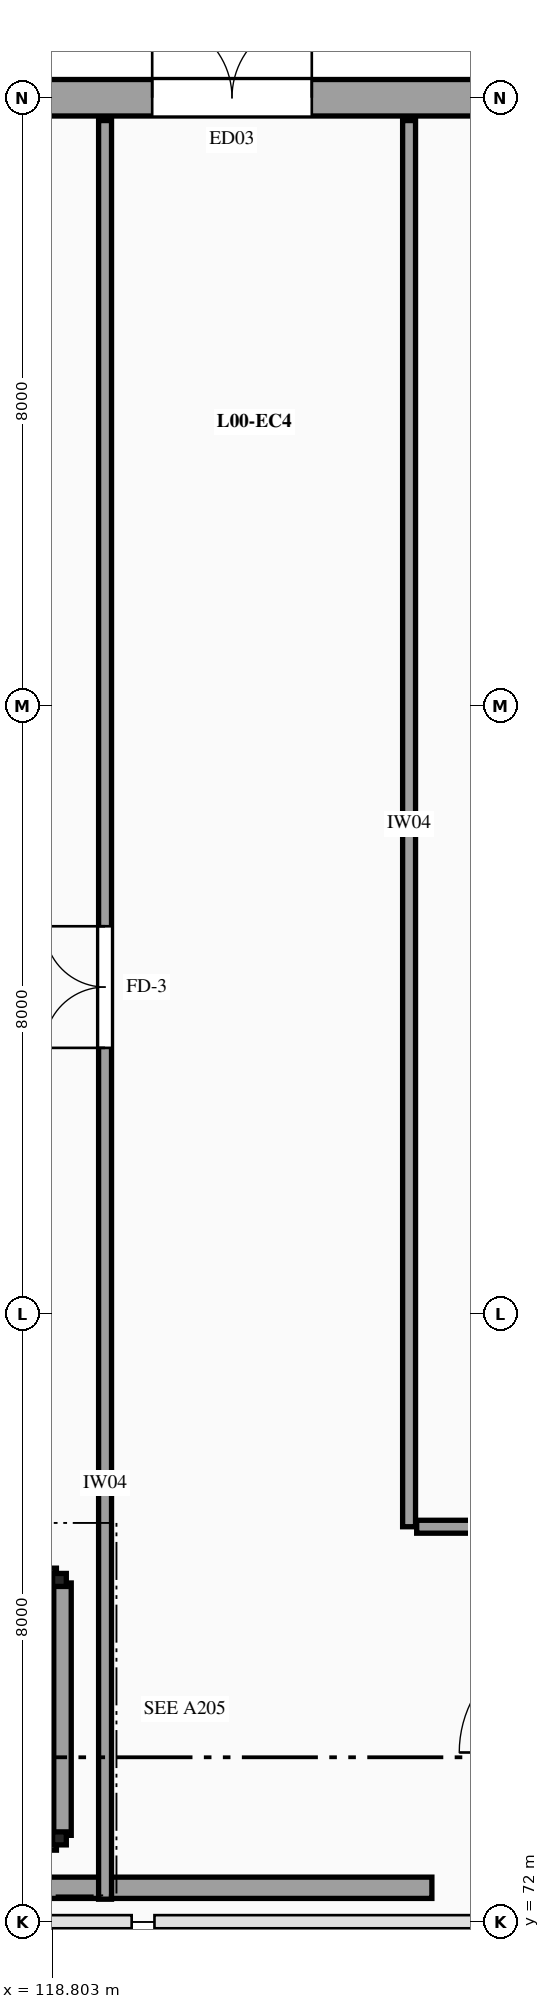
"""IFC4 building model, lengths in metres.
Left out: names, types, materials, properties, quantities, classifications, styles, units other than length and angle.
Written with IfcOpenShell. Run it as: python <this file> out.ifc"""

import sys

from ifc_helpers import new_model, si_unit, direction, frame, frame_2d, origin, origin_2d, place, context, subcontext, project, spatial, rectangle, i_section, extrude, element, fill, save


model = new_model("IFC4")
c1 = context("Model", 3, precision=1e-05, world=origin(), true_north=direction((0.0, 1.0)))
c2 = subcontext(c1, "Body", "Model", "MODEL_VIEW")
j1 = project(units=[si_unit("LENGTHUNIT", "METRE"), si_unit("PLANEANGLEUNIT", "RADIAN")], contexts=[c1])
p1 = place(None, origin())
s1 = spatial("IfcSite", under=j1, at=p1, CompositionType="ELEMENT")
p2 = place(p1, origin())
s2 = spatial("IfcBuilding", under=s1, at=p2, CompositionType="ELEMENT")
p3 = place(p2, origin())
s3 = spatial("IfcBuildingStorey", under=s2, at=p3, CompositionType="ELEMENT", Elevation=0.0)
for number, where, z_axis, x_axis in (
    (1, (118.9, 73.1, 0.0), (0.0, 0.0, 1.0), (1.0, 0.0, 0.0)),
    (2, (118.9, 76.5, 0.0), (0.0, 0.0, 1.0), (1.0, 0.0, 0.0)),
):
    element("IfcColumn", number, at=place(p3, frame(where, z_axis=z_axis, x_axis=x_axis)), inside=s3, PredefinedType="COLUMN", context=c2, shape_type="SweptSolid", body=[
        extrude(i_section(OverallWidth=0.18, OverallDepth=0.171, WebThickness=0.006, FlangeThickness=0.01, FilletRadius=0.015, at=origin_2d()), origin(), (0.0, 0.0, 1.0), 4.5),
    ])
p4 = place(p3, frame((115.22, 96.0, 0.0), z_axis=(0.0, 0.0, 1.0), x_axis=(1.0, 0.0, 0.0)))
e3 = element("IfcWall", 3, at=p4, inside=s3, PredefinedType="SOLIDWALL", context=c2, shape_type="SweptSolid", body=[
    extrude(rectangle(XDim=9.56, YDim=0.48, at=frame_2d((4.78, 0.0))), origin(), (0.0, 0.0, 1.0), 3.56),
])
p5 = place(p4, frame((4.9, 0.0, 0.0)))
e4 = element("IfcOpeningElement", 4, at=p5, cuts=e3, PredefinedType="OPENING", context=c2, shape_type="SweptSolid", body=[
    extrude(rectangle(XDim=2.1, YDim=2.4, at=frame_2d((1.05, 1.2))), frame((0.0, 0.25, 0.0), z_axis=(0.0, -1.0, 0.0), x_axis=(1.0, 0.0, 0.0)), (0.0, 0.0, 1.0), 0.5),
])
p6 = place(p3, frame((116.2, 72.45, 0.0), z_axis=(0.0, 0.0, 1.0), x_axis=(1.0, 0.0, 0.0)))
e5 = element("IfcWall", 5, at=p6, inside=s3, PredefinedType="PARAPET", context=c2, shape_type="SweptSolid", body=[
    extrude(rectangle(XDim=7.6, YDim=0.28, at=frame_2d((3.8, 0.0))), origin(), (0.0, 0.0, 1.0), 0.95),
])
p7 = place(p3, frame((119.5, 72.3, 0.0), z_axis=(0.0, 0.0, 1.0), x_axis=(0.0, 1.0, 0.0)))
e6 = element("IfcWall", 6, at=p7, inside=s3, PredefinedType="SOLIDWALL", context=c2, shape_type="SweptSolid", body=[
    extrude(rectangle(XDim=23.4, YDim=0.17, at=frame_2d((11.7, 0.0))), origin(), (0.0, 0.0, 1.0), 3.6),
])
p8 = place(p7, frame((11.2, 0.0, 0.0)))
e7 = element("IfcOpeningElement", 7, at=p8, cuts=e6, PredefinedType="OPENING", context=c2, shape_type="SweptSolid", body=[
    extrude(rectangle(XDim=1.6, YDim=2.25, at=frame_2d((0.8, 1.125))), frame((0.0, 0.095, 0.0), z_axis=(0.0, -1.0, 0.0), x_axis=(1.0, 0.0, 0.0)), (0.0, 0.0, 1.0), 0.19),
])
p9 = place(p3, frame((123.5, 77.2, 0.0), z_axis=(0.0, 0.0, 1.0), x_axis=(0.0, 1.0, 0.0)))
e8 = element("IfcWall", 8, at=p9, inside=s3, PredefinedType="SOLIDWALL", context=c2, shape_type="SweptSolid", body=[
    extrude(rectangle(XDim=18.5, YDim=0.17, at=frame_2d((9.25, 0.0))), origin(), (0.0, 0.0, 1.0), 3.6),
])
p10 = place(p3, frame((123.6, 77.2, 0.0), z_axis=(0.0, 0.0, 1.0), x_axis=(1.0, 0.0, 0.0)))
e9 = element("IfcWall", 9, at=p10, inside=s3, PredefinedType="SOLIDWALL", context=c2, shape_type="SweptSolid", body=[
    extrude(rectangle(XDim=2.0, YDim=0.17, at=frame_2d((1.0, 0.0))), origin(), (0.0, 0.0, 1.0), 3.6),
])
p11 = place(p3, frame((116.34, 73.06, 0.0), z_axis=(0.0, 0.0, 1.0), x_axis=(1.0, 0.0, 0.0)))
e10 = element("IfcWall", 10, at=p11, inside=s3, PredefinedType="SOLIDWALL", context=c2, shape_type="SweptSolid", body=[
    extrude(rectangle(XDim=2.52, YDim=0.23, at=frame_2d((1.26, 0.0))), origin(), (0.0, 0.0, 1.0), 3.6),
])
p12 = place(p3, frame((116.34, 76.54, 0.0), z_axis=(0.0, 0.0, 1.0), x_axis=(1.0, 0.0, 0.0)))
e11 = element("IfcWall", 11, at=p12, inside=s3, PredefinedType="SOLIDWALL", context=c2, shape_type="SweptSolid", body=[
    extrude(rectangle(XDim=2.52, YDim=0.23, at=frame_2d((1.26, 0.0))), origin(), (0.0, 0.0, 1.0), 3.6),
])
p13 = place(p12, frame((0.71, 0.0, 0.0)))
e12 = element("IfcOpeningElement", 12, at=p13, cuts=e11, PredefinedType="OPENING", context=c2, shape_type="SweptSolid", body=[
    extrude(rectangle(XDim=1.1, YDim=2.2, at=frame_2d((0.55, 1.1))), frame((0.0, 0.125, 0.0), z_axis=(0.0, -1.0, 0.0), x_axis=(1.0, 0.0, 0.0)), (0.0, 0.0, 1.0), 0.25),
])
p14 = place(p3, frame((118.94, 73.14, 0.0), z_axis=(0.0, 0.0, 1.0), x_axis=(0.0, 1.0, 0.0)))
e13 = element("IfcWall", 13, at=p14, inside=s3, PredefinedType="SOLIDWALL", context=c2, shape_type="SweptSolid", body=[
    extrude(rectangle(XDim=3.32, YDim=0.23, at=frame_2d((1.66, 0.0))), origin(), (0.0, 0.0, 1.0), 3.6),
])
p15 = place(p5, origin())
e14 = element("IfcDoor", 14, at=p15, inside=s3, OperationType="DOUBLE_DOOR_SINGLE_SWING", PredefinedType="DOOR", context=c2, shape_type="SweptSolid", body=[
    extrude(rectangle(XDim=2.1, YDim=2.4, at=frame_2d((1.05, 1.2))), frame((0.0, 0.025, 0.0), z_axis=(0.0, -1.0, 0.0), x_axis=(1.0, 0.0, 0.0)), (0.0, 0.0, 1.0), 0.05),
])
fill(e4, e14)
p16 = place(p8, origin())
e15 = element("IfcDoor", 15, at=p16, inside=s3, OperationType="DOUBLE_DOOR_SINGLE_SWING", PredefinedType="DOOR", context=c2, shape_type="SweptSolid", body=[
    extrude(rectangle(XDim=1.6, YDim=2.25, at=frame_2d((0.8, 1.125))), frame((0.0, 0.025, 0.0), z_axis=(0.0, -1.0, 0.0), x_axis=(1.0, 0.0, 0.0)), (0.0, 0.0, 1.0), 0.05),
])
fill(e7, e15)
save(model, sys.argv[1])
